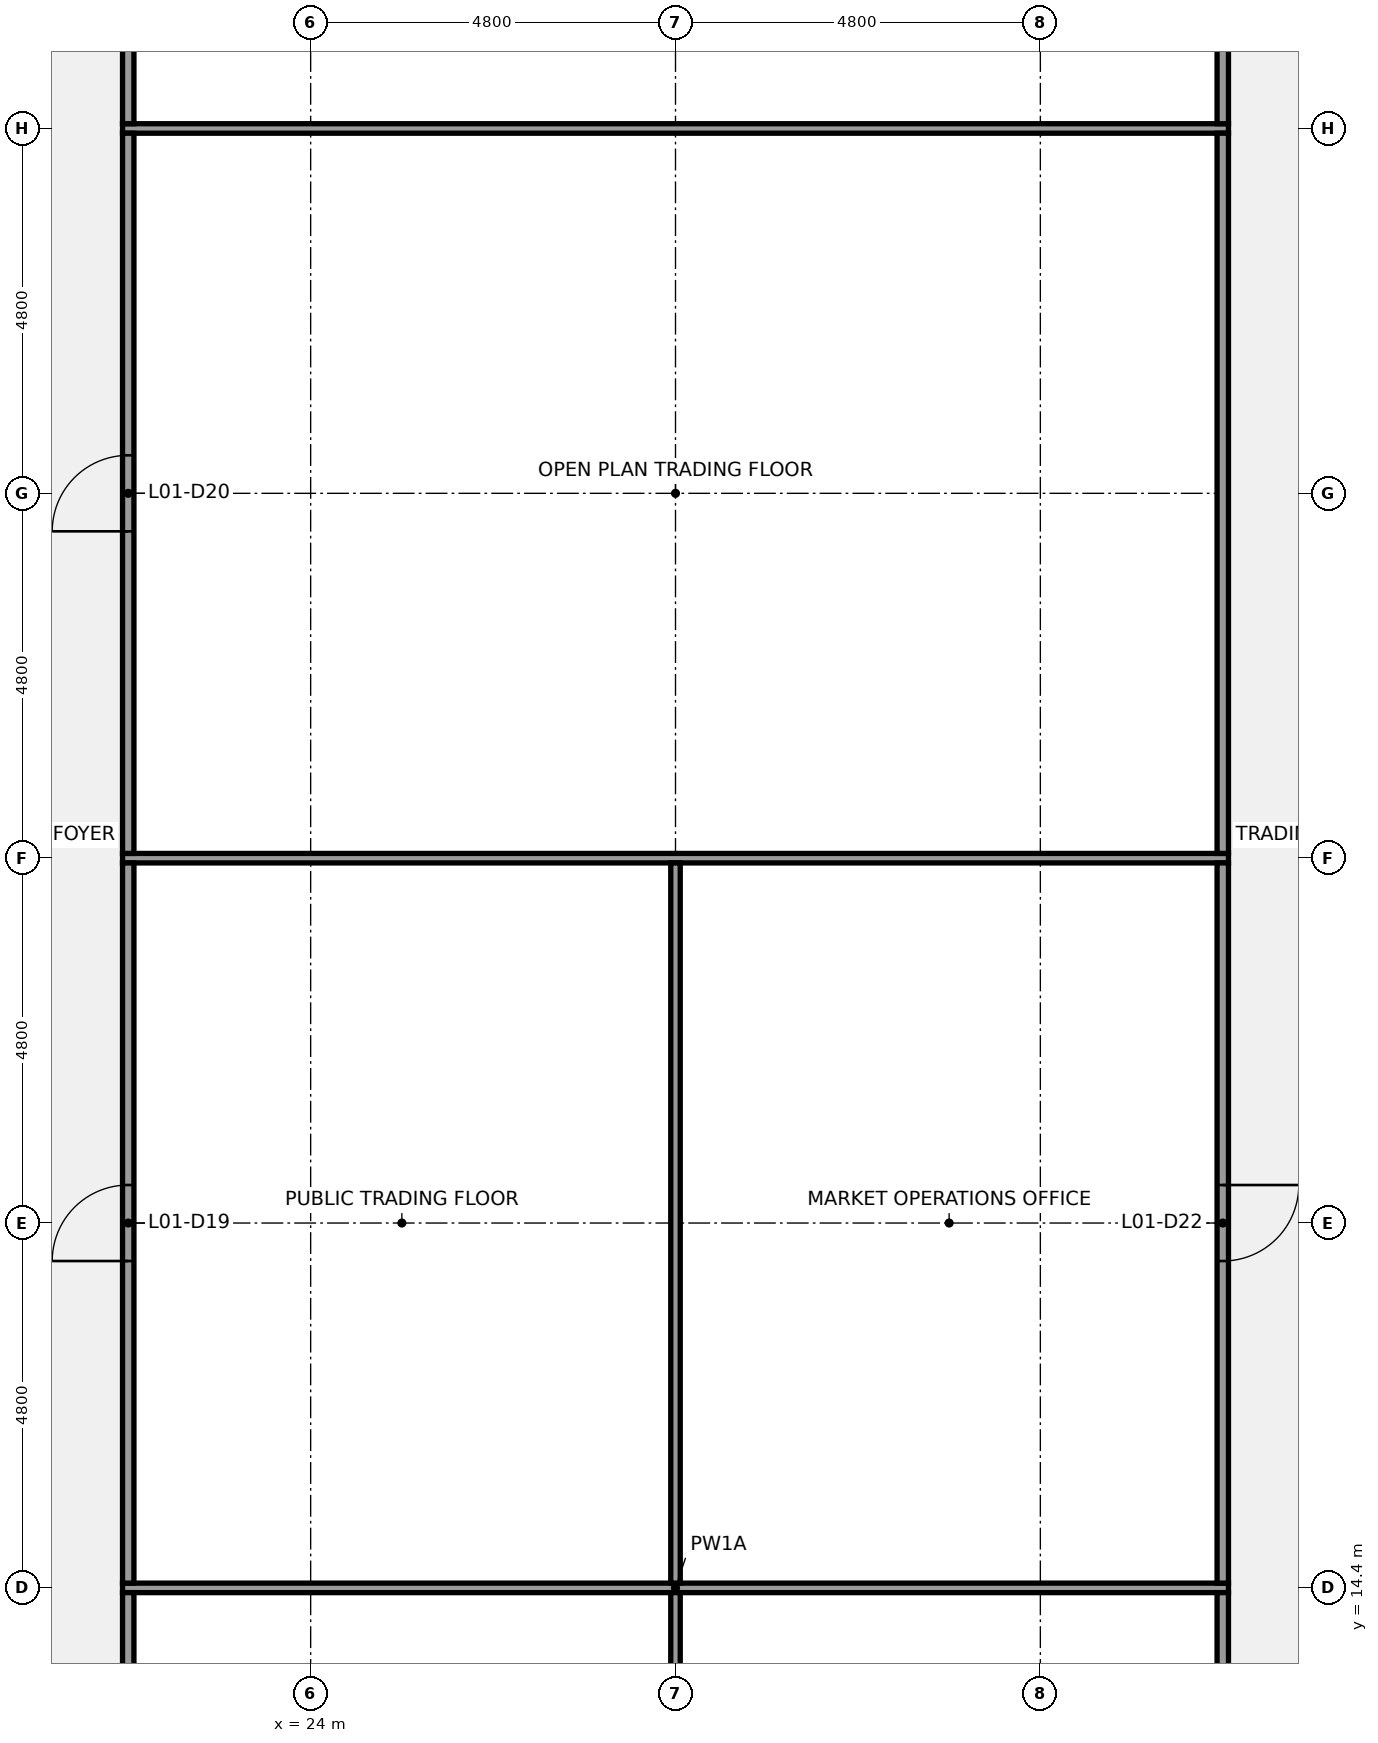
"""IFC4 building model, lengths in metres.
Left out: names, types, materials, properties, quantities, classifications, styles, units other than length and angle.
Written with IfcOpenShell. Run it as: python <this file> out.ifc"""

import sys

from ifc_helpers import new_model, si_unit, direction, frame, frame_2d, origin, place, context, subcontext, project, spatial, rectangle, extrude, element, fill, save


model = new_model("IFC4")
c1 = context("Model", 3, precision=1e-05, world=origin(), true_north=direction((0.0, 1.0)))
c2 = subcontext(c1, "Body", "Model", "MODEL_VIEW")
j1 = project(units=[si_unit("LENGTHUNIT", "METRE"), si_unit("PLANEANGLEUNIT", "RADIAN")], contexts=[c1])
p1 = place(None, origin())
s1 = spatial("IfcSite", under=j1, at=p1, CompositionType="ELEMENT")
p2 = place(p1, origin())
s2 = spatial("IfcBuilding", under=s1, at=p2, CompositionType="ELEMENT")
p3 = place(p2, frame((0.0, 0.0, 12.6)))
s3 = spatial("IfcBuildingStorey", under=s2, at=p3, CompositionType="ELEMENT", Elevation=12.6)
for number, where, z_axis, x_axis in (
    (1, (21.525, 14.4, 0.0), (0.0, 0.0, 1.0), (1.0, 0.0, 0.0)),
    (2, (21.525, 24.0, 0.0), (0.0, 0.0, 1.0), (1.0, 0.0, 0.0)),
    (3, (21.525, 33.6, 0.0), (0.0, 0.0, 1.0), (1.0, 0.0, 0.0)),
):
    element("IfcWall", number, at=place(p3, frame(where, z_axis=z_axis, x_axis=x_axis)), inside=s3, PredefinedType="PARTITIONING", context=c2, shape_type="SweptSolid", body=[
        extrude(rectangle(XDim=14.55, YDim=0.125, at=frame_2d((7.275, 0.0))), origin(), (0.0, 0.0, 1.0), 3.27),
    ])
p4 = place(p3, frame((21.6, 7.275, 0.0), z_axis=(0.0, 0.0, 1.0), x_axis=(0.0, 1.0, 0.0)))
e4 = element("IfcWall", 4, at=p4, inside=s3, PredefinedType="PARTITIONING", context=c2, shape_type="SweptSolid", body=[
    extrude(rectangle(XDim=7.062, YDim=0.15, at=frame_2d((3.531, 0.0))), origin(), (0.0, 0.0, 1.0), 3.27),
])
p5 = place(p4, frame((3.031, 0.0, 0.0)))
e5 = element("IfcOpeningElement", 5, at=p5, cuts=e4, PredefinedType="OPENING", context=c2, shape_type="SweptSolid", body=[
    extrude(rectangle(XDim=1.0, YDim=2.1, at=frame_2d((0.5, 1.05))), frame((0.0, 0.085, 0.0), z_axis=(0.0, -1.0, 0.0), x_axis=(1.0, 0.0, 0.0)), (0.0, 0.0, 1.0), 0.17),
])
p6 = place(p3, frame((21.6, 14.462, 0.0), z_axis=(0.0, 0.0, 1.0), x_axis=(0.0, 1.0, 0.0)))
e6 = element("IfcWall", 6, at=p6, inside=s3, PredefinedType="PARTITIONING", context=c2, shape_type="SweptSolid", body=[
    extrude(rectangle(XDim=9.475, YDim=0.15, at=frame_2d((4.738, 0.0))), origin(), (0.0, 0.0, 1.0), 3.27),
])
p7 = place(p6, frame((4.238, 0.0, 0.0)))
e7 = element("IfcOpeningElement", 7, at=p7, cuts=e6, PredefinedType="OPENING", context=c2, shape_type="SweptSolid", body=[
    extrude(rectangle(XDim=1.0, YDim=2.1, at=frame_2d((0.5, 1.05))), frame((0.0, 0.085, 0.0), z_axis=(0.0, -1.0, 0.0), x_axis=(1.0, 0.0, 0.0)), (0.0, 0.0, 1.0), 0.17),
])
p8 = place(p3, frame((21.6, 24.062, 0.0), z_axis=(0.0, 0.0, 1.0), x_axis=(0.0, 1.0, 0.0)))
e8 = element("IfcWall", 8, at=p8, inside=s3, PredefinedType="PARTITIONING", context=c2, shape_type="SweptSolid", body=[
    extrude(rectangle(XDim=9.475, YDim=0.15, at=frame_2d((4.738, 0.0))), origin(), (0.0, 0.0, 1.0), 3.27),
])
p9 = place(p8, frame((4.238, 0.0, 0.0)))
e9 = element("IfcOpeningElement", 9, at=p9, cuts=e8, PredefinedType="OPENING", context=c2, shape_type="SweptSolid", body=[
    extrude(rectangle(XDim=1.0, YDim=2.1, at=frame_2d((0.5, 1.05))), frame((0.0, 0.085, 0.0), z_axis=(0.0, -1.0, 0.0), x_axis=(1.0, 0.0, 0.0)), (0.0, 0.0, 1.0), 0.17),
])
p10 = place(p3, frame((21.6, 33.663, 0.0), z_axis=(0.0, 0.0, 1.0), x_axis=(0.0, 1.0, 0.0)))
e10 = element("IfcWall", 10, at=p10, inside=s3, PredefinedType="PARTITIONING", context=c2, shape_type="SweptSolid", body=[
    extrude(rectangle(XDim=7.062, YDim=0.15, at=frame_2d((3.531, 0.0))), origin(), (0.0, 0.0, 1.0), 3.27),
])
p11 = place(p3, frame((28.8, 7.275, 0.0), z_axis=(0.0, 0.0, 1.0), x_axis=(0.0, 1.0, 0.0)))
e11 = element("IfcWall", 11, at=p11, inside=s3, PredefinedType="PARTITIONING", context=c2, shape_type="SweptSolid", body=[
    extrude(rectangle(XDim=7.062, YDim=0.125, at=frame_2d((3.531, 0.0))), origin(), (0.0, 0.0, 1.0), 3.27),
])
p12 = place(p3, frame((28.8, 14.462, 0.0), z_axis=(0.0, 0.0, 1.0), x_axis=(0.0, 1.0, 0.0)))
e12 = element("IfcWall", 12, at=p12, inside=s3, PredefinedType="PARTITIONING", context=c2, shape_type="SweptSolid", body=[
    extrude(rectangle(XDim=9.475, YDim=0.125, at=frame_2d((4.738, 0.0))), origin(), (0.0, 0.0, 1.0), 3.27),
])
p13 = place(p3, frame((36.0, 7.275, 0.0), z_axis=(0.0, 0.0, 1.0), x_axis=(0.0, 1.0, 0.0)))
e13 = element("IfcWall", 13, at=p13, inside=s3, PredefinedType="PARTITIONING", context=c2, shape_type="SweptSolid", body=[
    extrude(rectangle(XDim=7.062, YDim=0.15, at=frame_2d((3.531, 0.0))), origin(), (0.0, 0.0, 1.0), 3.27),
])
p14 = place(p13, frame((3.031, 0.0, 0.0)))
e14 = element("IfcOpeningElement", 14, at=p14, cuts=e13, PredefinedType="OPENING", context=c2, shape_type="SweptSolid", body=[
    extrude(rectangle(XDim=1.0, YDim=2.1, at=frame_2d((0.5, 1.05))), frame((0.0, 0.085, 0.0), z_axis=(0.0, -1.0, 0.0), x_axis=(1.0, 0.0, 0.0)), (0.0, 0.0, 1.0), 0.17),
])
p15 = place(p3, frame((36.0, 14.462, 0.0), z_axis=(0.0, 0.0, 1.0), x_axis=(0.0, 1.0, 0.0)))
e15 = element("IfcWall", 15, at=p15, inside=s3, PredefinedType="PARTITIONING", context=c2, shape_type="SweptSolid", body=[
    extrude(rectangle(XDim=9.475, YDim=0.15, at=frame_2d((4.738, 0.0))), origin(), (0.0, 0.0, 1.0), 3.27),
])
p16 = place(p15, frame((4.238, 0.0, 0.0)))
e16 = element("IfcOpeningElement", 16, at=p16, cuts=e15, PredefinedType="OPENING", context=c2, shape_type="SweptSolid", body=[
    extrude(rectangle(XDim=1.0, YDim=2.1, at=frame_2d((0.5, 1.05))), frame((0.0, 0.085, 0.0), z_axis=(0.0, -1.0, 0.0), x_axis=(1.0, 0.0, 0.0)), (0.0, 0.0, 1.0), 0.17),
])
p17 = place(p3, frame((36.0, 24.062, 0.0), z_axis=(0.0, 0.0, 1.0), x_axis=(0.0, 1.0, 0.0)))
e17 = element("IfcWall", 17, at=p17, inside=s3, PredefinedType="PARTITIONING", context=c2, shape_type="SweptSolid", body=[
    extrude(rectangle(XDim=9.475, YDim=0.15, at=frame_2d((4.738, 0.0))), origin(), (0.0, 0.0, 1.0), 3.27),
])
p18 = place(p3, frame((36.0, 33.663, 0.0), z_axis=(0.0, 0.0, 1.0), x_axis=(0.0, 1.0, 0.0)))
e18 = element("IfcWall", 18, at=p18, inside=s3, PredefinedType="PARTITIONING", context=c2, shape_type="SweptSolid", body=[
    extrude(rectangle(XDim=7.062, YDim=0.15, at=frame_2d((3.531, 0.0))), origin(), (0.0, 0.0, 1.0), 3.27),
])
p19 = place(p7, origin())
e19 = element("IfcDoor", 19, at=p19, inside=s3, OperationType="SINGLE_SWING_LEFT", PredefinedType="DOOR", context=c2, shape_type="SweptSolid", body=[
    extrude(rectangle(XDim=1.0, YDim=2.1, at=frame_2d((0.5, 1.05))), frame((0.0, 0.025, 0.0), z_axis=(0.0, -1.0, 0.0), x_axis=(1.0, 0.0, 0.0)), (0.0, 0.0, 1.0), 0.05),
])
fill(e7, e19)
p20 = place(p9, origin())
e20 = element("IfcDoor", 20, at=p20, inside=s3, OperationType="SINGLE_SWING_LEFT", PredefinedType="DOOR", context=c2, shape_type="SweptSolid", body=[
    extrude(rectangle(XDim=1.0, YDim=2.1, at=frame_2d((0.5, 1.05))), frame((0.0, 0.025, 0.0), z_axis=(0.0, -1.0, 0.0), x_axis=(1.0, 0.0, 0.0)), (0.0, 0.0, 1.0), 0.05),
])
fill(e9, e20)
p21 = place(p16, origin())
e21 = element("IfcDoor", 21, at=p21, inside=s3, OperationType="SINGLE_SWING_RIGHT", PredefinedType="DOOR", context=c2, shape_type="SweptSolid", body=[
    extrude(rectangle(XDim=1.0, YDim=2.1, at=frame_2d((0.5, 1.05))), frame((0.0, 0.025, 0.0), z_axis=(0.0, -1.0, 0.0), x_axis=(1.0, 0.0, 0.0)), (0.0, 0.0, 1.0), 0.05),
])
fill(e16, e21)
save(model, sys.argv[1])
